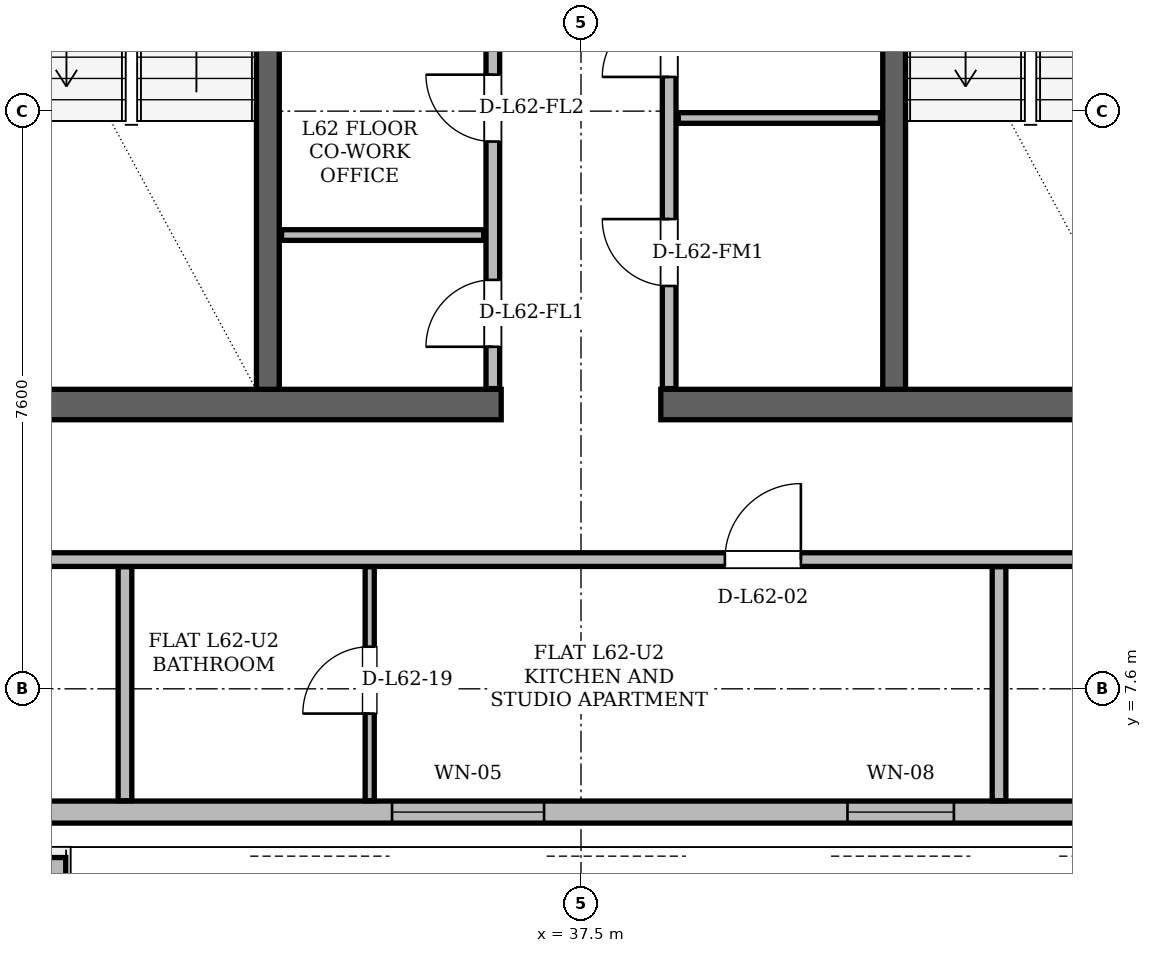
"""IFC4 building model, lengths in metres.
Left out: names, types, materials, properties, quantities, classifications, styles, units other than length and angle.
Written with IfcOpenShell. Run it as: python <this file> out.ifc"""

import sys

from ifc_helpers import new_model, si_unit, direction, frame, frame_2d, origin, place, context, subcontext, project, spatial, polyline, rectangle, outline, extrude, element, fill, save


model = new_model("IFC4")
c1 = context("Model", 3, precision=1e-05, world=origin(), true_north=direction((0.0, 1.0)))
c2 = subcontext(c1, "Body", "Model", "MODEL_VIEW")
j1 = project(units=[si_unit("LENGTHUNIT", "METRE"), si_unit("PLANEANGLEUNIT", "RADIAN")], contexts=[c1])
p1 = place(None, origin())
s1 = spatial("IfcSite", under=j1, at=p1, CompositionType="ELEMENT")
p2 = place(p1, origin())
s2 = spatial("IfcBuilding", under=s1, at=p2, CompositionType="ELEMENT")
p3 = place(p2, frame((0.0, 0.0, 234.3)))
s3 = spatial("IfcBuildingStorey", under=s2, at=p3, CompositionType="ELEMENT", Elevation=234.3)
for number, where, z_axis, x_axis in (
    (1, (29.35, 11.34, 0.0), (0.0, 0.0, 1.0), (1.0, 0.0, 0.0)),
    (2, (38.55, 11.34, 0.0), (0.0, 0.0, 1.0), (1.0, 0.0, 0.0)),
):
    element("IfcWall", number, at=place(p3, frame(where, z_axis=z_axis, x_axis=x_axis)), inside=s3, PredefinedType="SHEAR", context=c2, shape_type="SweptSolid", body=[
        extrude(rectangle(XDim=7.1, YDim=0.4, at=frame_2d((3.55, 0.0))), origin(), (0.0, 0.0, 1.0), 3.38),
    ])
for number, where, z_axis, x_axis in (
    (3, (33.38, 11.54, 0.0), (0.0, 0.0, 1.0), (0.0, 1.0, 0.0)),
    (4, (41.62, 11.54, 0.0), (0.0, 0.0, 1.0), (0.0, 1.0, 0.0)),
):
    element("IfcWall", number, at=place(p3, frame(where, z_axis=z_axis, x_axis=x_axis)), inside=s3, PredefinedType="SHEAR", context=c2, shape_type="SweptSolid", body=[
        extrude(rectangle(XDim=7.62, YDim=0.3, at=frame_2d((3.81, 0.0))), origin(), (0.0, 0.0, 1.0), 3.38),
    ])
p4 = place(p3, frame((19.076, 5.979, 0.0), z_axis=(0.0, 0.0, 1.0), x_axis=(1.0, 0.0, 0.0)))
e5 = element("IfcWall", 5, at=p4, inside=s3, PredefinedType="SOLIDWALL", context=c2, shape_type="SweptSolid", body=[
    extrude(rectangle(XDim=36.848, YDim=0.29, at=frame_2d((18.424, 0.0))), origin(), (0.0, 0.0, 1.0), 2.677),
])
p5 = place(p4, frame((8.034, 0.0, 0.0)))
e6 = element("IfcOpeningElement", 6, at=p5, cuts=e5, PredefinedType="OPENING", context=c2, shape_type="SweptSolid", body=[
    extrude(rectangle(XDim=1.5, YDim=2.2, at=frame_2d((0.75, 1.1))), frame((0.0, 0.145, 0.0), z_axis=(0.0, -1.0, 0.0), x_axis=(1.0, 0.0, 0.0)), (0.0, 0.0, 1.0), 0.29),
])
p6 = place(p4, frame((28.768, 0.0, 0.0)))
e7 = element("IfcOpeningElement", 7, at=p6, cuts=e5, PredefinedType="OPENING", context=c2, shape_type="SweptSolid", body=[
    extrude(rectangle(XDim=1.5, YDim=2.2, at=frame_2d((0.75, 1.1))), frame((0.0, 0.145, 0.0), z_axis=(0.0, -1.0, 0.0), x_axis=(1.0, 0.0, 0.0)), (0.0, 0.0, 1.0), 0.29),
])
p7 = place(p4, frame((2.481, 0.0, 0.85)))
e8 = element("IfcOpeningElement", 8, at=p7, cuts=e5, PredefinedType="OPENING", context=c2, shape_type="SweptSolid", body=[
    extrude(rectangle(XDim=2.4, YDim=1.717, at=frame_2d((1.2, 0.858))), frame((0.0, 0.145, 0.0), z_axis=(0.0, -1.0, 0.0), x_axis=(1.0, 0.0, 0.0)), (0.0, 0.0, 1.0), 0.29),
])
p8 = place(p4, frame((15.938, 0.0, 0.85)))
e9 = element("IfcOpeningElement", 9, at=p8, cuts=e5, PredefinedType="OPENING", context=c2, shape_type="SweptSolid", body=[
    extrude(rectangle(XDim=2.0, YDim=1.717, at=frame_2d((1.0, 0.858))), frame((0.0, 0.145, 0.0), z_axis=(0.0, -1.0, 0.0), x_axis=(1.0, 0.0, 0.0)), (0.0, 0.0, 1.0), 0.29),
])
p9 = place(p4, frame((21.93, 0.0, 0.85)))
e10 = element("IfcOpeningElement", 10, at=p9, cuts=e5, PredefinedType="OPENING", context=c2, shape_type="SweptSolid", body=[
    extrude(rectangle(XDim=1.4, YDim=1.6, at=frame_2d((0.7, 0.8))), frame((0.0, 0.145, 0.0), z_axis=(0.0, -1.0, 0.0), x_axis=(1.0, 0.0, 0.0)), (0.0, 0.0, 1.0), 0.29),
])
p10 = place(p4, frame((26.982, 0.0, 0.85)))
e11 = element("IfcOpeningElement", 11, at=p10, cuts=e5, PredefinedType="OPENING", context=c2, shape_type="SweptSolid", body=[
    extrude(rectangle(XDim=1.2, YDim=1.48, at=frame_2d((0.6, 0.74))), frame((0.0, 0.145, 0.0), z_axis=(0.0, -1.0, 0.0), x_axis=(1.0, 0.0, 0.0)), (0.0, 0.0, 1.0), 0.29),
])
p11 = place(p4, frame((32.441, 0.0, 0.85)))
e12 = element("IfcOpeningElement", 12, at=p11, cuts=e5, PredefinedType="OPENING", context=c2, shape_type="SweptSolid", body=[
    extrude(rectangle(XDim=1.2, YDim=1.48, at=frame_2d((0.6, 0.74))), frame((0.0, 0.145, 0.0), z_axis=(0.0, -1.0, 0.0), x_axis=(1.0, 0.0, 0.0)), (0.0, 0.0, 1.0), 0.29),
])
p12 = place(p3, frame((58.942, 11.205, 0.0), z_axis=(0.0, 0.0, 1.0), x_axis=(-0.500000614513, 0.866025048995, 0.0)))
e13 = element("IfcWall", 13, at=p12, inside=s3, PredefinedType="SOLIDWALL", context=c2, shape_type="SweptSolid", body=[
    extrude(rectangle(XDim=36.848, YDim=0.29, at=frame_2d((18.424, 0.0))), origin(), (0.0, 0.0, 1.0), 2.677),
])
p13 = place(p12, frame((7.615, 0.0, 0.0)))
e14 = element("IfcOpeningElement", 14, at=p13, cuts=e13, PredefinedType="OPENING", context=c2, shape_type="SweptSolid", body=[
    extrude(rectangle(XDim=1.5, YDim=2.2, at=frame_2d((0.75, 1.1))), frame((0.0, 0.145, 0.0), z_axis=(0.0, -1.0, 0.0), x_axis=(1.0, 0.0, 0.0)), (0.0, 0.0, 1.0), 0.29),
])
p14 = place(p12, frame((28.658, 0.0, 0.0)))
e15 = element("IfcOpeningElement", 15, at=p14, cuts=e13, PredefinedType="OPENING", context=c2, shape_type="SweptSolid", body=[
    extrude(rectangle(XDim=1.3, YDim=2.2, at=frame_2d((0.65, 1.1))), frame((0.0, 0.145, 0.0), z_axis=(0.0, -1.0, 0.0), x_axis=(1.0, 0.0, 0.0)), (0.0, 0.0, 1.0), 0.29),
])
p15 = place(p12, frame((3.643, 0.0, 0.85)))
e16 = element("IfcOpeningElement", 16, at=p15, cuts=e13, PredefinedType="OPENING", context=c2, shape_type="SweptSolid", body=[
    extrude(rectangle(XDim=1.2, YDim=1.48, at=frame_2d((0.6, 0.74))), frame((0.0, 0.145, 0.0), z_axis=(0.0, -1.0, 0.0), x_axis=(1.0, 0.0, 0.0)), (0.0, 0.0, 1.0), 0.29),
])
p16 = place(p12, frame((1.09, 0.0, 0.85)))
e17 = element("IfcOpeningElement", 17, at=p16, cuts=e13, PredefinedType="OPENING", context=c2, shape_type="SweptSolid", body=[
    extrude(rectangle(XDim=1.6, YDim=1.7, at=frame_2d((0.8, 0.85))), frame((0.0, 0.145, 0.0), z_axis=(0.0, -1.0, 0.0), x_axis=(1.0, 0.0, 0.0)), (0.0, 0.0, 1.0), 0.29),
])
p17 = place(p12, frame((34.714, 0.0, 0.85)))
e18 = element("IfcOpeningElement", 18, at=p17, cuts=e13, PredefinedType="OPENING", context=c2, shape_type="SweptSolid", body=[
    extrude(rectangle(XDim=1.2, YDim=1.48, at=frame_2d((0.6, 0.74))), frame((0.0, 0.145, 0.0), z_axis=(0.0, -1.0, 0.0), x_axis=(1.0, 0.0, 0.0)), (0.0, 0.0, 1.0), 0.29),
])
p18 = place(p12, frame((31.648, 0.0, 0.85)))
e19 = element("IfcOpeningElement", 19, at=p18, cuts=e13, PredefinedType="OPENING", context=c2, shape_type="SweptSolid", body=[
    extrude(rectangle(XDim=1.2, YDim=1.48, at=frame_2d((0.6, 0.74))), frame((0.0, 0.145, 0.0), z_axis=(0.0, -1.0, 0.0), x_axis=(1.0, 0.0, 0.0)), (0.0, 0.0, 1.0), 0.29),
])
p19 = place(p12, frame((16.738, 0.0, 0.85)))
e20 = element("IfcOpeningElement", 20, at=p19, cuts=e13, PredefinedType="OPENING", context=c2, shape_type="SweptSolid", body=[
    extrude(rectangle(XDim=2.2, YDim=1.717, at=frame_2d((1.1, 0.858))), frame((0.0, 0.145, 0.0), z_axis=(0.0, -1.0, 0.0), x_axis=(1.0, 0.0, 0.0)), (0.0, 0.0, 1.0), 0.29),
])
p20 = place(p12, frame((22.794, 0.0, 0.85)))
e21 = element("IfcOpeningElement", 21, at=p20, cuts=e13, PredefinedType="OPENING", context=c2, shape_type="SweptSolid", body=[
    extrude(rectangle(XDim=1.6, YDim=1.7, at=frame_2d((0.8, 0.85))), frame((0.0, 0.145, 0.0), z_axis=(0.0, -1.0, 0.0), x_axis=(1.0, 0.0, 0.0)), (0.0, 0.0, 1.0), 0.29),
])
p21 = place(p12, frame((12.349, 0.0, 0.85)))
e22 = element("IfcOpeningElement", 22, at=p21, cuts=e13, PredefinedType="OPENING", context=c2, shape_type="SweptSolid", body=[
    extrude(rectangle(XDim=1.2, YDim=1.48, at=frame_2d((0.6, 0.74))), frame((0.0, 0.145, 0.0), z_axis=(0.0, -1.0, 0.0), x_axis=(1.0, 0.0, 0.0)), (0.0, 0.0, 1.0), 0.29),
])
p22 = place(p3, frame((34.482, 43.116, 0.0), z_axis=(0.0, 0.0, 1.0), x_axis=(-0.500000614513, -0.866025048995, 0.0)))
e23 = element("IfcWall", 23, at=p22, inside=s3, PredefinedType="SOLIDWALL", context=c2, shape_type="SweptSolid", body=[
    extrude(rectangle(XDim=36.848, YDim=0.29, at=frame_2d((18.424, 0.0))), origin(), (0.0, 0.0, 1.0), 2.677),
])
p23 = place(p22, frame((8.034, 0.0, 0.0)))
e24 = element("IfcOpeningElement", 24, at=p23, cuts=e23, PredefinedType="OPENING", context=c2, shape_type="SweptSolid", body=[
    extrude(rectangle(XDim=1.5, YDim=2.2, at=frame_2d((0.75, 1.1))), frame((0.0, 0.145, 0.0), z_axis=(0.0, -1.0, 0.0), x_axis=(1.0, 0.0, 0.0)), (0.0, 0.0, 1.0), 0.29),
])
p24 = place(p22, frame((28.559, 0.0, 0.0)))
e25 = element("IfcOpeningElement", 25, at=p24, cuts=e23, PredefinedType="OPENING", context=c2, shape_type="SweptSolid", body=[
    extrude(rectangle(XDim=1.5, YDim=2.2, at=frame_2d((0.75, 1.1))), frame((0.0, 0.145, 0.0), z_axis=(0.0, -1.0, 0.0), x_axis=(1.0, 0.0, 0.0)), (0.0, 0.0, 1.0), 0.29),
])
p25 = place(p22, frame((21.863, 0.0, 0.85)))
e26 = element("IfcOpeningElement", 26, at=p25, cuts=e23, PredefinedType="OPENING", context=c2, shape_type="SweptSolid", body=[
    extrude(rectangle(XDim=2.4, YDim=1.717, at=frame_2d((1.2, 0.858))), frame((0.0, 0.145, 0.0), z_axis=(0.0, -1.0, 0.0), x_axis=(1.0, 0.0, 0.0)), (0.0, 0.0, 1.0), 0.29),
])
p26 = place(p22, frame((34.677, 0.0, 0.85)))
e27 = element("IfcOpeningElement", 27, at=p26, cuts=e23, PredefinedType="OPENING", context=c2, shape_type="SweptSolid", body=[
    extrude(rectangle(XDim=1.2, YDim=1.48, at=frame_2d((0.6, 0.74))), frame((0.0, 0.145, 0.0), z_axis=(0.0, -1.0, 0.0), x_axis=(1.0, 0.0, 0.0)), (0.0, 0.0, 1.0), 0.29),
])
p27 = place(p22, frame((32.477, 0.0, 0.85)))
e28 = element("IfcOpeningElement", 28, at=p27, cuts=e23, PredefinedType="OPENING", context=c2, shape_type="SweptSolid", body=[
    extrude(rectangle(XDim=1.4, YDim=1.6, at=frame_2d((0.7, 0.8))), frame((0.0, 0.145, 0.0), z_axis=(0.0, -1.0, 0.0), x_axis=(1.0, 0.0, 0.0)), (0.0, 0.0, 1.0), 0.29),
])
p28 = place(p22, frame((12.14, 0.0, 0.85)))
e29 = element("IfcOpeningElement", 29, at=p28, cuts=e23, PredefinedType="OPENING", context=c2, shape_type="SweptSolid", body=[
    extrude(rectangle(XDim=1.2, YDim=1.48, at=frame_2d((0.6, 0.74))), frame((0.0, 0.145, 0.0), z_axis=(0.0, -1.0, 0.0), x_axis=(1.0, 0.0, 0.0)), (0.0, 0.0, 1.0), 0.29),
])
p29 = place(p22, frame((16.54, 0.0, 0.85)))
e30 = element("IfcOpeningElement", 30, at=p29, cuts=e23, PredefinedType="OPENING", context=c2, shape_type="SweptSolid", body=[
    extrude(rectangle(XDim=2.0, YDim=1.717, at=frame_2d((1.0, 0.858))), frame((0.0, 0.145, 0.0), z_axis=(0.0, -1.0, 0.0), x_axis=(1.0, 0.0, 0.0)), (0.0, 0.0, 1.0), 0.29),
])
p30 = place(p22, frame((2.059, 0.0, 0.85)))
e31 = element("IfcOpeningElement", 31, at=p30, cuts=e23, PredefinedType="OPENING", context=c2, shape_type="SweptSolid", body=[
    extrude(rectangle(XDim=1.2, YDim=1.48, at=frame_2d((0.6, 0.74))), frame((0.0, 0.145, 0.0), z_axis=(0.0, -1.0, 0.0), x_axis=(1.0, 0.0, 0.0)), (0.0, 0.0, 1.0), 0.29),
])
p31 = place(p3, frame((30.605, 5.38, 0.0), z_axis=(0.0, 0.0, 1.0), x_axis=(0.0, -1.0, 0.0)))
e32 = element("IfcWall", 32, at=p31, inside=s3, PredefinedType="PARAPET", context=c2, shape_type="SweptSolid", body=[
    extrude(outline(polyline([(0.0, 0.0), (2.042, 0.0), (2.042, 1.1), (0.0, 1.32), (0.0, 0.0)])), frame((0.0, 0.115, 0.0), z_axis=(0.0, -1.0, 0.0), x_axis=(1.0, 0.0, 0.0)), (0.0, 0.0, 1.0), 0.23),
])
p32 = place(p3, frame((36.34, 11.55, 0.0), z_axis=(0.0, 0.0, 1.0), x_axis=(0.0, 1.0, 0.0)))
e33 = element("IfcWall", 33, at=p32, inside=s3, PredefinedType="PARTITIONING", context=c2, shape_type="SweptSolid", body=[
    extrude(rectangle(XDim=5.55, YDim=0.18, at=frame_2d((2.775, 0.0))), origin(), (0.0, 0.0, 1.0), 3.38),
])
p33 = place(p32, frame((0.55, 0.0, 0.0)))
e34 = element("IfcOpeningElement", 34, at=p33, cuts=e33, PredefinedType="OPENING", context=c2, shape_type="SweptSolid", body=[
    extrude(rectangle(XDim=0.88, YDim=2.08, at=frame_2d((0.44, 1.04))), frame((0.0, 0.09, 0.0), z_axis=(0.0, -1.0, 0.0), x_axis=(1.0, 0.0, 0.0)), (0.0, 0.0, 1.0), 0.18),
])
p34 = place(p32, frame((3.25, 0.0, 0.0)))
e35 = element("IfcOpeningElement", 35, at=p34, cuts=e33, PredefinedType="OPENING", context=c2, shape_type="SweptSolid", body=[
    extrude(rectangle(XDim=0.88, YDim=2.08, at=frame_2d((0.44, 1.04))), frame((0.0, 0.09, 0.0), z_axis=(0.0, -1.0, 0.0), x_axis=(1.0, 0.0, 0.0)), (0.0, 0.0, 1.0), 0.18),
])
p35 = place(p3, frame((33.56, 13.57, 0.0), z_axis=(0.0, 0.0, 1.0), x_axis=(1.0, 0.0, 0.0)))
e36 = element("IfcWall", 36, at=p35, inside=s3, PredefinedType="PARTITIONING", context=c2, shape_type="SweptSolid", body=[
    extrude(rectangle(XDim=2.66, YDim=0.14, at=frame_2d((1.33, 0.0))), origin(), (0.0, 0.0, 1.0), 3.38),
])
p36 = place(p3, frame((38.66, 11.55, 0.0), z_axis=(0.0, 0.0, 1.0), x_axis=(0.0, 1.0, 0.0)))
e37 = element("IfcWall", 37, at=p36, inside=s3, PredefinedType="PARTITIONING", context=c2, shape_type="SweptSolid", body=[
    extrude(rectangle(XDim=5.55, YDim=0.18, at=frame_2d((2.775, 0.0))), origin(), (0.0, 0.0, 1.0), 3.38),
])
p37 = place(p36, frame((1.35, 0.0, 0.0)))
e38 = element("IfcOpeningElement", 38, at=p37, cuts=e37, PredefinedType="OPENING", context=c2, shape_type="SweptSolid", body=[
    extrude(rectangle(XDim=0.88, YDim=2.08, at=frame_2d((0.44, 1.04))), frame((0.0, 0.09, 0.0), z_axis=(0.0, -1.0, 0.0), x_axis=(1.0, 0.0, 0.0)), (0.0, 0.0, 1.0), 0.18),
])
p38 = place(p36, frame((4.1, 0.0, 0.0)))
e39 = element("IfcOpeningElement", 39, at=p38, cuts=e37, PredefinedType="OPENING", context=c2, shape_type="SweptSolid", body=[
    extrude(rectangle(XDim=0.88, YDim=2.08, at=frame_2d((0.44, 1.04))), frame((0.0, 0.09, 0.0), z_axis=(0.0, -1.0, 0.0), x_axis=(1.0, 0.0, 0.0)), (0.0, 0.0, 1.0), 0.18),
])
p39 = place(p3, frame((38.78, 15.11, 0.0), z_axis=(0.0, 0.0, 1.0), x_axis=(1.0, 0.0, 0.0)))
e40 = element("IfcWall", 40, at=p39, inside=s3, PredefinedType="PARTITIONING", context=c2, shape_type="SweptSolid", body=[
    extrude(rectangle(XDim=2.66, YDim=0.14, at=frame_2d((1.33, 0.0))), origin(), (0.0, 0.0, 1.0), 3.38),
])
p40 = place(p3, frame((25.6, 9.3, 0.0), z_axis=(0.0, 0.0, 1.0), x_axis=(1.0, 0.0, 0.0)))
e41 = element("IfcWall", 41, at=p40, inside=s3, PredefinedType="PARTITIONING", context=c2, shape_type="SweptSolid", body=[
    extrude(rectangle(XDim=21.85, YDim=0.18, at=frame_2d((10.925, 0.0))), origin(), (0.0, 0.0, 1.0), 2.913),
])
p41 = place(p40, frame((2.325, 0.0, 0.0)))
e42 = element("IfcOpeningElement", 42, at=p41, cuts=e41, PredefinedType="OPENING", context=c2, shape_type="SweptSolid", body=[
    extrude(rectangle(XDim=1.0, YDim=2.18, at=frame_2d((0.5, 1.09))), frame((0.0, 0.09, 0.0), z_axis=(0.0, -1.0, 0.0), x_axis=(1.0, 0.0, 0.0)), (0.0, 0.0, 1.0), 0.18),
])
p42 = place(p40, frame((13.793, 0.0, 0.0)))
e43 = element("IfcOpeningElement", 43, at=p42, cuts=e41, PredefinedType="OPENING", context=c2, shape_type="SweptSolid", body=[
    extrude(rectangle(XDim=1.0, YDim=2.18, at=frame_2d((0.5, 1.09))), frame((0.0, 0.09, 0.0), z_axis=(0.0, -1.0, 0.0), x_axis=(1.0, 0.0, 0.0)), (0.0, 0.0, 1.0), 0.18),
])
p43 = place(p40, frame((18.812, 0.0, 0.0)))
e44 = element("IfcOpeningElement", 44, at=p43, cuts=e41, PredefinedType="OPENING", context=c2, shape_type="SweptSolid", body=[
    extrude(rectangle(XDim=1.0, YDim=2.18, at=frame_2d((0.5, 1.09))), frame((0.0, 0.09, 0.0), z_axis=(0.0, -1.0, 0.0), x_axis=(1.0, 0.0, 0.0)), (0.0, 0.0, 1.0), 0.18),
])
p44 = place(p3, frame((31.5, 6.127, 0.0), z_axis=(0.0, 0.0, 1.0), x_axis=(0.0, 1.0, 0.0)))
e45 = element("IfcWall", 45, at=p44, inside=s3, PredefinedType="PARTITIONING", context=c2, shape_type="SweptSolid", body=[
    extrude(rectangle(XDim=3.079, YDim=0.18, at=frame_2d((1.539, 0.0))), origin(), (0.0, 0.0, 1.0), 2.966),
])
p45 = place(p3, frame((34.72, 6.127, 0.0), z_axis=(0.0, 0.0, 1.0), x_axis=(0.0, 1.0, 0.0)))
e46 = element("IfcWall", 46, at=p45, inside=s3, PredefinedType="PARTITIONING", context=c2, shape_type="SweptSolid", body=[
    extrude(rectangle(XDim=3.079, YDim=0.12, at=frame_2d((1.539, 0.0))), origin(), (0.0, 0.0, 1.0), 3.38),
])
p46 = place(p45, frame((1.147, 0.0, 0.0)))
e47 = element("IfcOpeningElement", 47, at=p46, cuts=e46, PredefinedType="OPENING", context=c2, shape_type="SweptSolid", body=[
    extrude(rectangle(XDim=0.88, YDim=2.08, at=frame_2d((0.44, 1.04))), frame((0.0, 0.06, 0.0), z_axis=(0.0, -1.0, 0.0), x_axis=(1.0, 0.0, 0.0)), (0.0, 0.0, 1.0), 0.12),
])
p47 = place(p3, frame((43.0, 6.127, 0.0), z_axis=(0.0, 0.0, 1.0), x_axis=(0.0, 1.0, 0.0)))
e48 = element("IfcWall", 48, at=p47, inside=s3, PredefinedType="PARTITIONING", context=c2, shape_type="SweptSolid", body=[
    extrude(rectangle(XDim=3.079, YDim=0.18, at=frame_2d((1.539, 0.0))), origin(), (0.0, 0.0, 1.0), 3.38),
])
p48 = place(p8, origin())
e49 = element("IfcWindow", 49, at=p48, inside=s3, PartitioningType="SINGLE_PANEL", PredefinedType="WINDOW", context=c2, shape_type="SweptSolid", body=[
    extrude(rectangle(XDim=2.0, YDim=1.717, at=frame_2d((1.0, 0.858))), frame((0.0, 0.03, 0.0), z_axis=(0.0, -1.0, 0.0), x_axis=(1.0, 0.0, 0.0)), (0.0, 0.0, 1.0), 0.06),
])
fill(e9, e49)
p49 = place(p9, origin())
e50 = element("IfcWindow", 50, at=p49, inside=s3, PartitioningType="SINGLE_PANEL", PredefinedType="WINDOW", context=c2, shape_type="SweptSolid", body=[
    extrude(rectangle(XDim=1.4, YDim=1.6, at=frame_2d((0.7, 0.8))), frame((0.0, 0.03, 0.0), z_axis=(0.0, -1.0, 0.0), x_axis=(1.0, 0.0, 0.0)), (0.0, 0.0, 1.0), 0.06),
])
fill(e10, e50)
p50 = place(p33, origin())
e51 = element("IfcDoor", 51, at=p50, inside=s3, OperationType="SINGLE_SWING_LEFT", PredefinedType="DOOR", context=c2, shape_type="SweptSolid", body=[
    extrude(rectangle(XDim=0.88, YDim=2.08, at=frame_2d((0.44, 1.04))), frame((0.0, 0.025, 0.0), z_axis=(0.0, -1.0, 0.0), x_axis=(1.0, 0.0, 0.0)), (0.0, 0.0, 1.0), 0.05),
])
fill(e34, e51)
p51 = place(p34, origin())
e52 = element("IfcDoor", 52, at=p51, inside=s3, OperationType="SINGLE_SWING_RIGHT", PredefinedType="DOOR", context=c2, shape_type="SweptSolid", body=[
    extrude(rectangle(XDim=0.88, YDim=2.08, at=frame_2d((0.44, 1.04))), frame((0.0, 0.025, 0.0), z_axis=(0.0, -1.0, 0.0), x_axis=(1.0, 0.0, 0.0)), (0.0, 0.0, 1.0), 0.05),
])
fill(e35, e52)
p52 = place(p37, origin())
e53 = element("IfcDoor", 53, at=p52, inside=s3, OperationType="SINGLE_SWING_RIGHT", PredefinedType="DOOR", context=c2, shape_type="SweptSolid", body=[
    extrude(rectangle(XDim=0.88, YDim=2.08, at=frame_2d((0.44, 1.04))), frame((0.0, 0.025, 0.0), z_axis=(0.0, -1.0, 0.0), x_axis=(1.0, 0.0, 0.0)), (0.0, 0.0, 1.0), 0.05),
])
fill(e38, e53)
p53 = place(p38, origin())
e54 = element("IfcDoor", 54, at=p53, inside=s3, OperationType="SINGLE_SWING_LEFT", PredefinedType="DOOR", context=c2, shape_type="SweptSolid", body=[
    extrude(rectangle(XDim=0.88, YDim=2.08, at=frame_2d((0.44, 1.04))), frame((0.0, 0.025, 0.0), z_axis=(0.0, -1.0, 0.0), x_axis=(1.0, 0.0, 0.0)), (0.0, 0.0, 1.0), 0.05),
])
fill(e39, e54)
p54 = place(p42, origin())
e55 = element("IfcDoor", 55, at=p54, inside=s3, OperationType="SINGLE_SWING_RIGHT", PredefinedType="DOOR", context=c2, shape_type="SweptSolid", body=[
    extrude(rectangle(XDim=1.0, YDim=2.18, at=frame_2d((0.5, 1.09))), frame((0.0, 0.025, 0.0), z_axis=(0.0, -1.0, 0.0), x_axis=(1.0, 0.0, 0.0)), (0.0, 0.0, 1.0), 0.05),
])
fill(e43, e55)
p55 = place(p46, origin())
e56 = element("IfcDoor", 56, at=p55, inside=s3, OperationType="SINGLE_SWING_LEFT", PredefinedType="DOOR", context=c2, shape_type="SweptSolid", body=[
    extrude(rectangle(XDim=0.88, YDim=2.08, at=frame_2d((0.44, 1.04))), frame((0.0, 0.025, 0.0), z_axis=(0.0, -1.0, 0.0), x_axis=(1.0, 0.0, 0.0)), (0.0, 0.0, 1.0), 0.05),
])
fill(e47, e56)
save(model, sys.argv[1])
